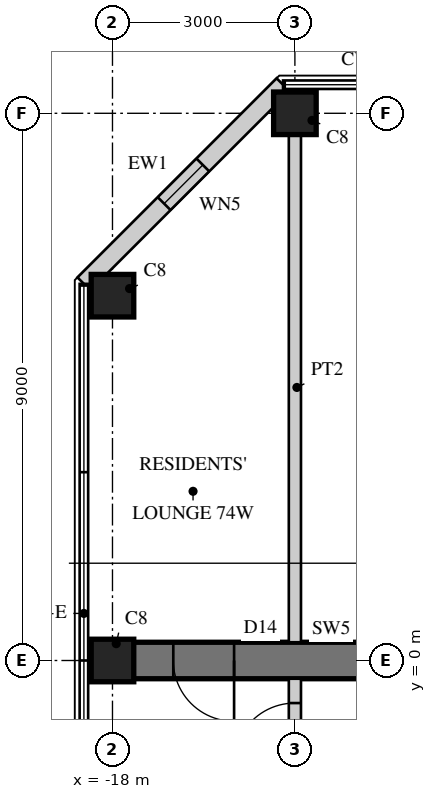
"""IFC4 building model, lengths in metres.
Left out: names, types, materials, properties, quantities, classifications, styles, units other than length and angle.
Written with IfcOpenShell. Run it as: python <this file> out.ifc"""

import sys

from ifc_helpers import new_model, si_unit, direction, frame, frame_2d, origin, origin_2d, place, context, subcontext, project, spatial, rectangle, hollow_rectangle, extrude, element, fill, save


model = new_model("IFC4")
c1 = context("Model", 3, precision=1e-05, world=origin(), true_north=direction((0.0, 1.0)))
c2 = subcontext(c1, "Body", "Model", "MODEL_VIEW")
j1 = project(units=[si_unit("LENGTHUNIT", "METRE"), si_unit("PLANEANGLEUNIT", "RADIAN")], contexts=[c1])
p1 = place(None, origin())
s1 = spatial("IfcSite", under=j1, at=p1, CompositionType="ELEMENT")
p2 = place(p1, origin())
s2 = spatial("IfcBuilding", under=s1, at=p2, CompositionType="ELEMENT")
p3 = place(p2, frame((0.0, 0.0, 284.9)))
s3 = spatial("IfcBuildingStorey", under=s2, at=p3, CompositionType="ELEMENT", Elevation=284.9)
p4 = place(p3, frame((-9.0, 0.0, 0.0), z_axis=(0.0, 0.0, 1.0), x_axis=(-1.0, 0.0, 0.0)))
e1 = element("IfcWall", 1, at=p4, inside=s3, PredefinedType="SHEAR", context=c2, shape_type="SweptSolid", body=[
    extrude(rectangle(XDim=9.0, YDim=0.6, at=frame_2d((4.5, 0.0))), origin(), (0.0, 0.0, 1.0), 3.4),
])
p5 = place(p4, frame((3.8, 0.0, 0.0)))
e2 = element("IfcOpeningElement", 2, at=p5, cuts=e1, PredefinedType="OPENING", context=c2, shape_type="SweptSolid", body=[
    extrude(rectangle(XDim=1.0, YDim=2.15, at=frame_2d((0.5, 1.075))), frame((0.0, 0.31, 0.0), z_axis=(0.0, -1.0, 0.0), x_axis=(1.0, 0.0, 0.0)), (0.0, 0.0, 1.0), 0.62),
])
p6 = place(p4, frame((7.0, 0.0, 0.0)))
e3 = element("IfcOpeningElement", 3, at=p6, cuts=e1, PredefinedType="OPENING", context=c2, shape_type="SweptSolid", body=[
    extrude(rectangle(XDim=1.0, YDim=2.2, at=frame_2d((0.5, 1.1))), frame((0.0, 0.31, 0.0), z_axis=(0.0, -1.0, 0.0), x_axis=(1.0, 0.0, 0.0)), (0.0, 0.0, 1.0), 0.62),
])
for number, where, z_axis, x_axis in (
    (4, (-15.0, 9.0, 0.0), (0.0, 0.0, 1.0), (1.0, 0.0, 0.0)),
    (5, (-18.0, 6.0, 0.0), (0.0, 0.0, 1.0), (1.0, 0.0, 0.0)),
    (6, (-18.0, 0.0, 0.0), (0.0, 0.0, 1.0), (1.0, 0.0, 0.0)),
):
    element("IfcColumn", number, at=place(p3, frame(where, z_axis=z_axis, x_axis=x_axis)), inside=s3, PredefinedType="COLUMN", context=c2, shape_type="SweptSolid", body=[
        extrude(rectangle(XDim=0.7, YDim=0.7, at=origin_2d()), origin(), (0.0, 0.0, 1.0), 3.4),
    ])
p7 = place(p3, frame((-15.195, 9.47, 0.0), z_axis=(0.0, 0.0, 1.0), x_axis=(-0.707106781187, -0.707106781187, 0.0)))
e7 = element("IfcWall", 7, at=p7, inside=s3, PredefinedType="SOLIDWALL", context=c2, shape_type="SweptSolid", body=[
    extrude(rectangle(XDim=4.632, YDim=0.3, at=frame_2d((2.316, 0.0))), origin(), (0.0, 0.0, 1.0), 3.2),
])
p8 = place(p7, frame((1.866, 0.0, 0.3)))
e8 = element("IfcOpeningElement", 8, at=p8, cuts=e7, PredefinedType="OPENING", context=c2, shape_type="SweptSolid", body=[
    extrude(rectangle(XDim=0.9, YDim=2.4, at=frame_2d((0.45, 1.2))), frame((0.0, 0.16, 0.0), z_axis=(0.0, -1.0, 0.0), x_axis=(1.0, 0.0, 0.0)), (0.0, 0.0, 1.0), 0.32),
])
p9 = place(p3, frame((-15.0, 8.65, 0.0), z_axis=(0.0, 0.0, 1.0), x_axis=(0.0, -1.0, 0.0)))
e9 = element("IfcWall", 9, at=p9, inside=s3, PredefinedType="SOLIDWALL", context=c2, shape_type="SweptSolid", body=[
    extrude(rectangle(XDim=8.35, YDim=0.2, at=frame_2d((4.175, 0.0))), origin(), (0.0, 0.0, 1.0), 2.5),
])
p10 = place(p3, frame((-15.0, -0.3, 0.0), z_axis=(0.0, 0.0, 1.0), x_axis=(0.0, -1.0, 0.0)))
e10 = element("IfcWall", 10, at=p10, inside=s3, PredefinedType="SOLIDWALL", context=c2, shape_type="SweptSolid", body=[
    extrude(rectangle(XDim=8.35, YDim=0.2, at=frame_2d((4.175, 0.0))), origin(), (0.0, 0.0, 1.0), 2.5),
])
p11 = place(p10, frame((0.4, 0.0, 0.0)))
e11 = element("IfcOpeningElement", 11, at=p11, cuts=e10, PredefinedType="OPENING", context=c2, shape_type="SweptSolid", body=[
    extrude(rectangle(XDim=1.0, YDim=2.2, at=frame_2d((0.5, 1.1))), frame((0.0, 0.11, 0.0), z_axis=(0.0, -1.0, 0.0), x_axis=(1.0, 0.0, 0.0)), (0.0, 0.0, 1.0), 0.22),
])
p12 = place(p8, origin())
e12 = element("IfcWindow", 12, at=p12, inside=s3, PartitioningType="SINGLE_PANEL", PredefinedType="WINDOW", context=c2, shape_type="SweptSolid", body=[
    extrude(hollow_rectangle(XDim=0.9, YDim=2.4, WallThickness=0.06, at=frame_2d((0.45, 1.2))), frame((0.0, 0.03, 0.0), z_axis=(0.0, -1.0, 0.0), x_axis=(1.0, 0.0, 0.0)), (0.0, 0.0, 1.0), 0.06),
    extrude(rectangle(XDim=0.779, YDim=2.279, at=frame_2d((0.45, 1.2))), frame((0.0, 0.03, 0.0), z_axis=(0.0, -1.0, 0.0), x_axis=(1.0, 0.0, 0.0)), (0.0, 0.0, 1.0), 0.06),
])
fill(e8, e12)
p13 = place(p11, frame((1.0, 0.0, 0.0), z_axis=(0.0, 0.0, 1.0), x_axis=(-1.0, 0.0, 0.0)))
e13 = element("IfcDoor", 13, at=p13, inside=s3, OperationType="SINGLE_SWING_LEFT", PredefinedType="DOOR", context=c2, shape_type="SweptSolid", body=[
    extrude(rectangle(XDim=1.0, YDim=2.2, at=frame_2d((0.5, 1.1))), frame((0.0, 0.025, 0.0), z_axis=(0.0, -1.0, 0.0), x_axis=(1.0, 0.0, 0.0)), (0.0, 0.0, 1.0), 0.05),
])
fill(e11, e13)
p14 = place(p6, origin())
e14 = element("IfcDoor", 14, at=p14, inside=s3, OperationType="SINGLE_SWING_LEFT", PredefinedType="DOOR", context=c2, shape_type="SweptSolid", body=[
    extrude(rectangle(XDim=1.0, YDim=2.2, at=frame_2d((0.5, 1.1))), frame((0.0, 0.025, 0.0), z_axis=(0.0, -1.0, 0.0), x_axis=(1.0, 0.0, 0.0)), (0.0, 0.0, 1.0), 0.05),
])
fill(e3, e14)
save(model, sys.argv[1])
